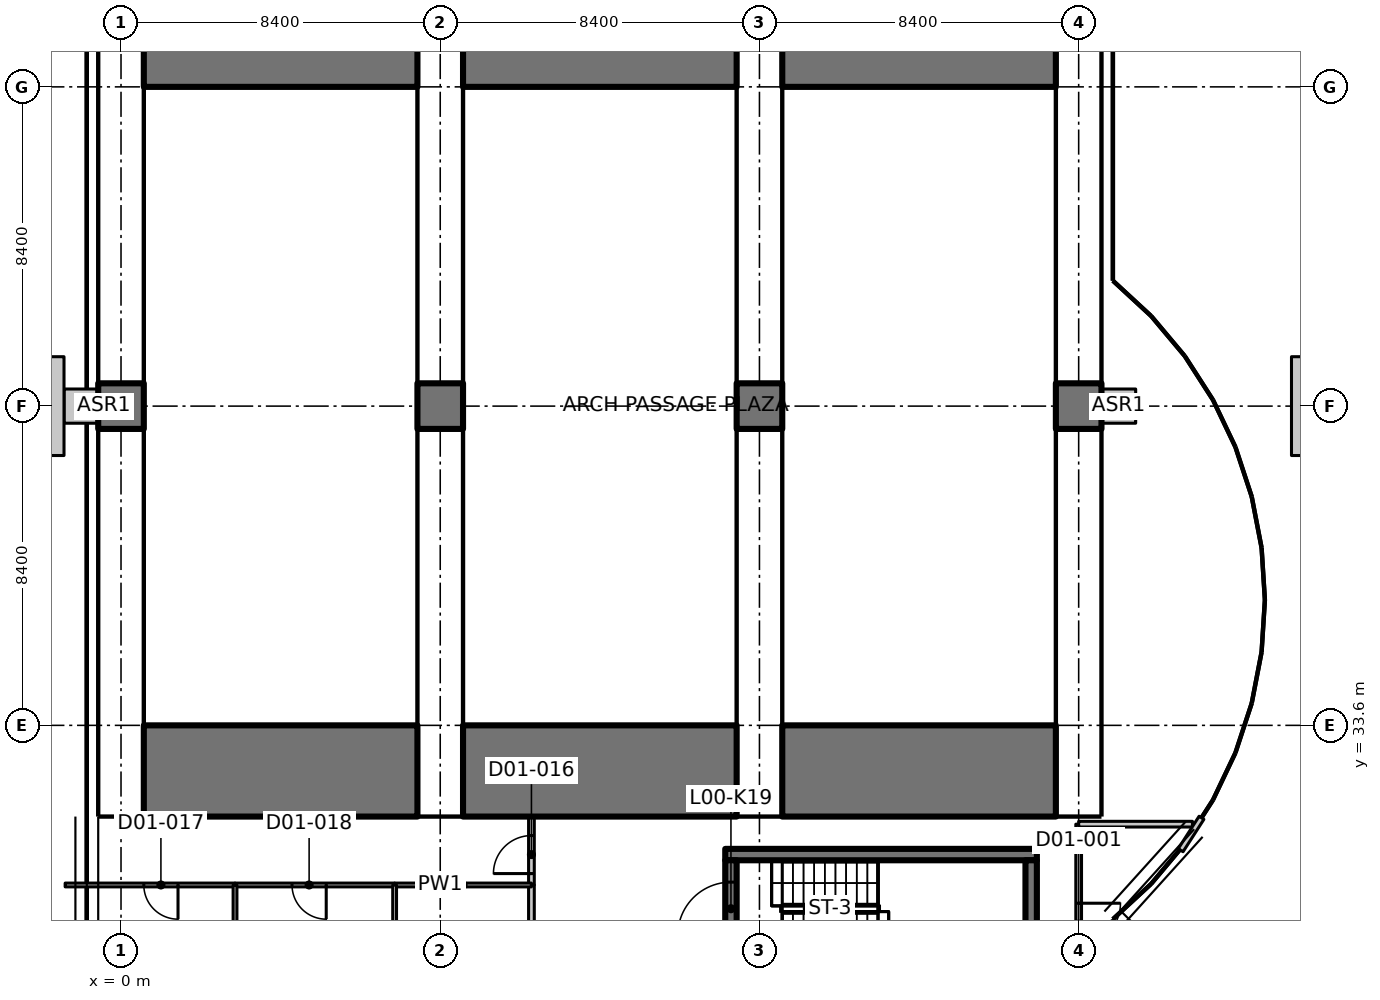
"""IFC4 building model, lengths in metres.
Left out: names, types, materials, properties, quantities, classifications, styles, units other than length and angle.
Written with IfcOpenShell. Run it as: python <this file> out.ifc"""

import sys

from ifc_helpers import new_model, si_unit, direction, frame, frame_2d, origin, place, context, subcontext, project, spatial, polyline, rectangle, outline, extrude, element, fill, save


model = new_model("IFC4")
c1 = context("Model", 3, precision=1e-05, world=origin(), true_north=direction((0.0, 1.0)))
c2 = subcontext(c1, "Body", "Model", "MODEL_VIEW")
j1 = project(units=[si_unit("LENGTHUNIT", "METRE"), si_unit("PLANEANGLEUNIT", "RADIAN")], contexts=[c1])
p1 = place(None, origin())
s1 = spatial("IfcSite", under=j1, at=p1, CompositionType="ELEMENT")
p2 = place(p1, origin())
s2 = spatial("IfcBuilding", under=s1, at=p2, CompositionType="ELEMENT")
p3 = place(p2, origin())
s3 = spatial("IfcBuildingStorey", under=s2, at=p3, CompositionType="ELEMENT", Elevation=0.0)
p4 = place(p3, frame((-0.6, 42.0, 0.0), z_axis=(1.0, 0.0, 0.0), x_axis=(0.0, 1.0, 0.0)))
e1 = element("IfcWall", 1, at=p4, inside=s3, PredefinedType="SOLIDWALL", context=c2, shape_type="SweptSolid", body=[
    extrude(outline(polyline([(-10.8, -6.3), (10.8, -6.3), (10.8, 36.25), (-10.8, 36.25), (-10.8, -6.3)]), holes=[polyline([(-8.4, 0.0), (-8.4, 26.6), (-8.36, 27.423), (-8.239, 28.239), (-8.038, 29.038), (-7.76, 29.814), (-7.408, 30.56), (-6.984, 31.267), (-6.493, 31.929), (-5.94, 32.54), (-5.329, 33.093), (-4.667, 33.584), (-3.96, 34.008), (-3.215, 34.361), (-2.438, 34.638), (-1.639, 34.839), (-0.823, 34.959), (0.0, 35.0), (0.823, 34.959), (1.639, 34.839), (2.438, 34.638), (3.215, 34.361), (3.96, 34.008), (4.667, 33.584), (5.329, 33.093), (5.94, 32.54), (6.493, 31.929), (6.984, 31.267), (7.408, 30.56), (7.76, 29.814), (8.038, 29.038), (8.239, 28.239), (8.36, 27.423), (8.4, 26.6), (8.4, 0.0), (-8.4, 0.0)])]), origin(), (0.0, 0.0, 1.0), 1.2),
])
for number, where, z_axis, x_axis in (
    (2, (7.8, 42.0, 0.0), (1.0, 0.0, 0.0), (0.0, 1.0, 0.0)),
    (3, (16.2, 42.0, 0.0), (1.0, 0.0, 0.0), (0.0, 1.0, 0.0)),
    (4, (24.6, 42.0, 0.0), (1.0, 0.0, 0.0), (0.0, 1.0, 0.0)),
):
    element("IfcWall", number, at=place(p3, frame(where, z_axis=z_axis, x_axis=x_axis)), inside=s3, PredefinedType="SOLIDWALL", context=c2, shape_type="SweptSolid", body=[
        extrude(outline(polyline([(-10.8, -6.3), (10.8, -6.3), (10.8, 36.25), (-10.8, 36.25), (-10.8, -6.3)]), holes=[polyline([(-8.4, 0.0), (-8.4, 26.6), (-8.36, 27.423), (-8.239, 28.239), (-8.038, 29.038), (-7.76, 29.814), (-7.408, 30.56), (-6.984, 31.267), (-6.493, 31.929), (-5.94, 32.54), (-5.329, 33.093), (-4.667, 33.584), (-3.96, 34.008), (-3.215, 34.361), (-2.438, 34.638), (-1.639, 34.839), (-0.823, 34.959), (0.0, 35.0), (0.823, 34.959), (1.639, 34.839), (2.438, 34.638), (3.215, 34.361), (3.96, 34.008), (4.667, 33.584), (5.329, 33.093), (5.94, 32.54), (6.493, 31.929), (6.984, 31.267), (7.408, 30.56), (7.76, 29.814), (8.038, 29.038), (8.239, 28.239), (8.36, 27.423), (8.4, 26.6), (8.4, 0.0), (-8.4, 0.0)])]), origin(), (0.0, 0.0, 1.0), 1.2),
    ])
for number, where, z_axis, x_axis in (
    (5, (0.6, 32.4, -6.3), (0.0, 0.0, 1.0), (1.0, 0.0, 0.0)),
    (6, (9.0, 32.4, -6.3), (0.0, 0.0, 1.0), (1.0, 0.0, 0.0)),
):
    element("IfcWall", number, at=place(p3, frame(where, z_axis=z_axis, x_axis=x_axis)), inside=s3, PredefinedType="SOLIDWALL", context=c2, shape_type="SweptSolid", body=[
        extrude(rectangle(XDim=7.2, YDim=2.4, at=frame_2d((3.6, 0.0))), origin(), (0.0, 0.0, 1.0), 42.55),
    ])
p5 = place(p3, frame((17.4, 32.4, -6.3), z_axis=(0.0, 0.0, 1.0), x_axis=(1.0, 0.0, 0.0)))
e7 = element("IfcWall", 7, at=p5, inside=s3, PredefinedType="SOLIDWALL", context=c2, shape_type="SweptSolid", body=[
    extrude(rectangle(XDim=7.2, YDim=2.4, at=frame_2d((3.6, 0.0))), origin(), (0.0, 0.0, 1.0), 42.55),
])
for number, where, z_axis, x_axis in (
    (8, (0.6, 51.6, -6.3), (0.0, 0.0, 1.0), (1.0, 0.0, 0.0)),
    (9, (9.0, 51.6, -6.3), (0.0, 0.0, 1.0), (1.0, 0.0, 0.0)),
):
    element("IfcWall", number, at=place(p3, frame(where, z_axis=z_axis, x_axis=x_axis)), inside=s3, PredefinedType="SOLIDWALL", context=c2, shape_type="SweptSolid", body=[
        extrude(rectangle(XDim=7.2, YDim=2.4, at=frame_2d((3.6, 0.0))), origin(), (0.0, 0.0, 1.0), 42.55),
    ])
p6 = place(p3, frame((17.4, 51.6, -6.3), z_axis=(0.0, 0.0, 1.0), x_axis=(1.0, 0.0, 0.0)))
e10 = element("IfcWall", 10, at=p6, inside=s3, PredefinedType="SOLIDWALL", context=c2, shape_type="SweptSolid", body=[
    extrude(rectangle(XDim=7.2, YDim=2.4, at=frame_2d((3.6, 0.0))), origin(), (0.0, 0.0, 1.0), 42.55),
])
p7 = place(p3, frame((-1.5, 42.0, 0.0), z_axis=(1.0, 0.0, 0.0), x_axis=(0.0, 1.0, 0.0)))
e11 = element("IfcWall", 11, at=p7, inside=s3, PredefinedType="SOLIDWALL", context=c2, shape_type="SweptSolid", body=[
    extrude(outline(polyline([(5.4, 35.953), (6.0, 35.58), (6.575, 35.168), (7.121, 34.72), (7.637, 34.237), (8.12, 33.721), (8.568, 33.175), (8.98, 32.6), (9.353, 32.0), (9.686, 31.377), (9.978, 30.733), (10.227, 30.072), (10.432, 29.395), (10.593, 28.707), (10.708, 28.01), (10.777, 27.306), (10.8, 26.6), (10.8, 0.0), (8.4, 0.0), (8.4, 26.6), (8.382, 27.149), (8.328, 27.696), (8.239, 28.239), (8.114, 28.774), (7.954, 29.3), (7.76, 29.814), (7.534, 30.315), (7.275, 30.8), (6.984, 31.267), (6.664, 31.714), (6.315, 32.138), (5.94, 32.54), (5.539, 32.915), (5.114, 33.264), (4.667, 33.584), (4.2, 33.875), (3.715, 34.134), (3.215, 34.361), (2.7, 34.554), (2.174, 34.714), (1.639, 34.839), (1.096, 34.928), (0.549, 34.982), (0.0, 35.0), (-0.549, 34.982), (-1.096, 34.928), (-1.639, 34.839), (-2.174, 34.714), (-2.7, 34.554), (-3.215, 34.361), (-3.715, 34.134), (-4.2, 33.875), (-4.667, 33.584), (-5.114, 33.264), (-5.539, 32.915), (-5.94, 32.54), (-6.315, 32.138), (-6.664, 31.714), (-6.984, 31.267), (-7.275, 30.8), (-7.534, 30.315), (-7.76, 29.814), (-7.954, 29.3), (-8.114, 28.774), (-8.239, 28.239), (-8.328, 27.696), (-8.382, 27.149), (-8.4, 26.6), (-8.4, 0.0), (-10.8, 0.0), (-10.8, 26.6), (-10.777, 27.306), (-10.708, 28.01), (-10.593, 28.707), (-10.432, 29.395), (-10.227, 30.072), (-9.978, 30.733), (-9.686, 31.377), (-9.353, 32.0), (-8.98, 32.6), (-8.568, 33.175), (-8.12, 33.721), (-7.637, 34.237), (-7.121, 34.72), (-6.575, 35.168), (-6.0, 35.58), (-5.4, 35.953), (-4.844, 36.25), (4.844, 36.25), (5.4, 35.953)])), origin(), (0.0, 0.0, 1.0), 0.9),
])
p8 = place(p3, frame((-4.1, 42.0, 0.0), z_axis=(1.0, 0.0, 0.0), x_axis=(0.0, 1.0, 0.0)))
e12 = element("IfcWall", 12, at=p8, inside=s3, PredefinedType="SOLIDWALL", context=c2, shape_type="SweptSolid", body=[
    extrude(outline(polyline([(13.304, 32.111), (13.636, 31.229), (13.909, 30.327), (14.123, 29.409), (14.277, 28.479), (14.369, 27.542), (14.4, 26.6), (14.4, 0.0), (8.4, 0.0), (8.4, 26.6), (8.382, 27.149), (8.328, 27.696), (8.239, 28.239), (8.114, 28.774), (7.954, 29.3), (7.76, 29.814), (7.534, 30.315), (7.275, 30.8), (6.984, 31.267), (6.664, 31.714), (6.315, 32.138), (5.94, 32.54), (5.539, 32.915), (5.114, 33.264), (4.667, 33.584), (4.2, 33.875), (3.715, 34.134), (3.215, 34.361), (2.7, 34.554), (2.174, 34.714), (1.639, 34.839), (1.096, 34.928), (0.549, 34.982), (0.0, 35.0), (-0.549, 34.982), (-1.096, 34.928), (-1.639, 34.839), (-2.174, 34.714), (-2.7, 34.554), (-3.215, 34.361), (-3.715, 34.134), (-4.2, 33.875), (-4.667, 33.584), (-5.114, 33.264), (-5.539, 32.915), (-5.94, 32.54), (-6.315, 32.138), (-6.664, 31.714), (-6.984, 31.267), (-7.275, 30.8), (-7.534, 30.315), (-7.76, 29.814), (-7.954, 29.3), (-8.114, 28.774), (-8.239, 28.239), (-8.328, 27.696), (-8.382, 27.149), (-8.4, 26.6), (-8.4, 0.0), (-14.4, 0.0), (-14.4, 26.6), (-14.369, 27.542), (-14.277, 28.479), (-14.123, 29.409), (-13.909, 30.327), (-13.636, 31.229), (-13.304, 32.111), (-13.241, 32.25), (-10.8, 32.25), (-10.8, 36.123), (-10.182, 36.782), (-9.495, 37.427), (-8.766, 38.024), (-8.0, 38.573), (-7.2, 39.071), (-6.369, 39.515), (-5.51, 39.904), (-4.629, 40.236), (-3.727, 40.509), (-2.809, 40.723), (-1.88, 40.877), (-0.942, 40.969), (0.0, 41.0), (0.942, 40.969), (1.88, 40.877), (2.809, 40.723), (3.727, 40.509), (4.629, 40.236), (5.51, 39.904), (6.369, 39.515), (7.2, 39.071), (8.0, 38.573), (8.766, 38.024), (9.495, 37.427), (10.182, 36.782), (10.8, 36.123), (10.8, 32.25), (13.241, 32.25), (13.304, 32.111)])), origin(), (0.0, 0.0, 1.0), 2.6),
])
p9 = place(p3, frame((25.8, 42.0, 0.0), z_axis=(1.0, 0.0, 0.0), x_axis=(0.0, 1.0, 0.0)))
e13 = element("IfcWall", 13, at=p9, inside=s3, PredefinedType="SOLIDWALL", context=c2, shape_type="SweptSolid", body=[
    extrude(outline(polyline([(5.4, 35.953), (6.0, 35.58), (6.575, 35.168), (7.121, 34.72), (7.637, 34.237), (8.12, 33.721), (8.568, 33.175), (8.98, 32.6), (9.353, 32.0), (9.686, 31.377), (9.978, 30.733), (10.227, 30.072), (10.432, 29.395), (10.593, 28.707), (10.708, 28.01), (10.777, 27.306), (10.8, 26.6), (10.8, 0.0), (8.4, 0.0), (8.4, 26.6), (8.382, 27.149), (8.328, 27.696), (8.239, 28.239), (8.114, 28.774), (7.954, 29.3), (7.76, 29.814), (7.534, 30.315), (7.275, 30.8), (6.984, 31.267), (6.664, 31.714), (6.315, 32.138), (5.94, 32.54), (5.539, 32.915), (5.114, 33.264), (4.667, 33.584), (4.2, 33.875), (3.715, 34.134), (3.215, 34.361), (2.7, 34.554), (2.174, 34.714), (1.639, 34.839), (1.096, 34.928), (0.549, 34.982), (0.0, 35.0), (-0.549, 34.982), (-1.096, 34.928), (-1.639, 34.839), (-2.174, 34.714), (-2.7, 34.554), (-3.215, 34.361), (-3.715, 34.134), (-4.2, 33.875), (-4.667, 33.584), (-5.114, 33.264), (-5.539, 32.915), (-5.94, 32.54), (-6.315, 32.138), (-6.664, 31.714), (-6.984, 31.267), (-7.275, 30.8), (-7.534, 30.315), (-7.76, 29.814), (-7.954, 29.3), (-8.114, 28.774), (-8.239, 28.239), (-8.328, 27.696), (-8.382, 27.149), (-8.4, 26.6), (-8.4, 0.0), (-10.8, 0.0), (-10.8, 26.6), (-10.777, 27.306), (-10.708, 28.01), (-10.593, 28.707), (-10.432, 29.395), (-10.227, 30.072), (-9.978, 30.733), (-9.686, 31.377), (-9.353, 32.0), (-8.98, 32.6), (-8.568, 33.175), (-8.12, 33.721), (-7.637, 34.237), (-7.121, 34.72), (-6.575, 35.168), (-6.0, 35.58), (-5.4, 35.953), (-4.844, 36.25), (4.844, 36.25), (5.4, 35.953)])), origin(), (0.0, 0.0, 1.0), 0.9),
])
p10 = place(p3, frame((30.8, 42.0, 0.0), z_axis=(1.0, 0.0, 0.0), x_axis=(0.0, 1.0, 0.0)))
e14 = element("IfcWall", 14, at=p10, inside=s3, PredefinedType="SOLIDWALL", context=c2, shape_type="SweptSolid", body=[
    extrude(outline(polyline([(13.304, 32.111), (13.636, 31.229), (13.909, 30.327), (14.123, 29.409), (14.277, 28.479), (14.369, 27.542), (14.4, 26.6), (14.4, 0.0), (8.4, 0.0), (8.4, 26.6), (8.382, 27.149), (8.328, 27.696), (8.239, 28.239), (8.114, 28.774), (7.954, 29.3), (7.76, 29.814), (7.534, 30.315), (7.275, 30.8), (6.984, 31.267), (6.664, 31.714), (6.315, 32.138), (5.94, 32.54), (5.539, 32.915), (5.114, 33.264), (4.667, 33.584), (4.2, 33.875), (3.715, 34.134), (3.215, 34.361), (2.7, 34.554), (2.174, 34.714), (1.639, 34.839), (1.096, 34.928), (0.549, 34.982), (0.0, 35.0), (-0.549, 34.982), (-1.096, 34.928), (-1.639, 34.839), (-2.174, 34.714), (-2.7, 34.554), (-3.215, 34.361), (-3.715, 34.134), (-4.2, 33.875), (-4.667, 33.584), (-5.114, 33.264), (-5.539, 32.915), (-5.94, 32.54), (-6.315, 32.138), (-6.664, 31.714), (-6.984, 31.267), (-7.275, 30.8), (-7.534, 30.315), (-7.76, 29.814), (-7.954, 29.3), (-8.114, 28.774), (-8.239, 28.239), (-8.328, 27.696), (-8.382, 27.149), (-8.4, 26.6), (-8.4, 0.0), (-14.4, 0.0), (-14.4, 26.6), (-14.369, 27.542), (-14.277, 28.479), (-14.123, 29.409), (-13.909, 30.327), (-13.636, 31.229), (-13.304, 32.111), (-13.241, 32.25), (-10.8, 32.25), (-10.8, 36.123), (-10.182, 36.782), (-9.495, 37.427), (-8.766, 38.024), (-8.0, 38.573), (-7.2, 39.071), (-6.369, 39.515), (-5.51, 39.904), (-4.629, 40.236), (-3.727, 40.509), (-2.809, 40.723), (-1.88, 40.877), (-0.942, 40.969), (0.0, 41.0), (0.942, 40.969), (1.88, 40.877), (2.809, 40.723), (3.727, 40.509), (4.629, 40.236), (5.51, 39.904), (6.369, 39.515), (7.2, 39.071), (8.0, 38.573), (8.766, 38.024), (9.495, 37.427), (10.182, 36.782), (10.8, 36.123), (10.8, 32.25), (13.241, 32.25), (13.304, 32.111)])), origin(), (0.0, 0.0, 1.0), 2.6),
])
p11 = place(p3, frame((15.9, 30.2, 0.0), z_axis=(0.0, 0.0, 1.0), x_axis=(1.0, 0.0, 0.0)))
e15 = element("IfcWall", 15, at=p11, inside=s3, PredefinedType="SHEAR", context=c2, shape_type="SweptSolid", body=[
    extrude(rectangle(XDim=8.2, YDim=0.3, at=frame_2d((4.1, 0.0))), origin(), (0.0, 0.0, 1.0), 6.75),
])
p12 = place(p3, frame((16.05, 27.5, 0.0), z_axis=(0.0, 0.0, 1.0), x_axis=(0.0, 1.0, 0.0)))
e16 = element("IfcWall", 16, at=p12, inside=s3, PredefinedType="SHEAR", context=c2, shape_type="SweptSolid", body=[
    extrude(rectangle(XDim=2.55, YDim=0.3, at=frame_2d((1.275, 0.0))), origin(), (0.0, 0.0, 1.0), 6.75),
])
p13 = place(p12, frame((0.575, 0.0, 0.0)))
e17 = element("IfcOpeningElement", 17, at=p13, cuts=e16, PredefinedType="OPENING", context=c2, shape_type="SweptSolid", body=[
    extrude(rectangle(XDim=1.4, YDim=2.1, at=frame_2d((0.7, 1.05))), frame((0.0, 0.16, 0.0), z_axis=(0.0, -1.0, 0.0), x_axis=(1.0, 0.0, 0.0)), (0.0, 0.0, 1.0), 0.32),
])
p14 = place(p3, frame((23.95, 27.5, 0.0), z_axis=(0.0, 0.0, 1.0), x_axis=(0.0, 1.0, 0.0)))
e18 = element("IfcWall", 18, at=p14, inside=s3, PredefinedType="SHEAR", context=c2, shape_type="SweptSolid", body=[
    extrude(rectangle(XDim=2.55, YDim=0.3, at=frame_2d((1.275, 0.0))), origin(), (0.0, 0.0, 1.0), 6.75),
])
p15 = place(p3, frame((25.2, 31.0, 0.0), z_axis=(0.0, 0.0, 1.0), x_axis=(0.0, -1.0, 0.0)))
e19 = element("IfcWall", 19, at=p15, inside=s3, PredefinedType="PARTITIONING", context=c2, shape_type="SweptSolid", body=[
    extrude(rectangle(XDim=4.98, YDim=0.15, at=frame_2d((2.49, 0.0))), origin(), (0.0, 0.0, 1.0), 6.73),
])
p16 = place(p15, frame((2.08, 0.0, 0.0)))
e20 = element("IfcOpeningElement", 20, at=p16, cuts=e19, PredefinedType="OPENING", context=c2, shape_type="SweptSolid", body=[
    extrude(rectangle(XDim=1.1, YDim=2.1, at=frame_2d((0.55, 1.05))), frame((0.0, 0.085, 0.0), z_axis=(0.0, -1.0, 0.0), x_axis=(1.0, 0.0, 0.0)), (0.0, 0.0, 1.0), 0.17),
])
p17 = place(p3, frame((25.2, 31.0, 0.0), z_axis=(0.0, 0.0, 1.0), x_axis=(1.0, 0.0, 0.0)))
e21 = element("IfcWall", 21, at=p17, inside=s3, PredefinedType="PARTITIONING", context=c2, shape_type="SweptSolid", body=[
    extrude(rectangle(XDim=2.994, YDim=0.15, at=frame_2d((1.497, 0.0))), origin(), (0.0, 0.0, 1.0), 6.73),
])
p18 = place(p3, frame((28.432, 31.168, 0.0), z_axis=(0.0, 0.0, 1.0), x_axis=(-0.540854867502, -0.841115932734, 0.0)))
e22 = element("IfcWall", 22, at=p18, inside=s3, PredefinedType="PARTITIONING", context=c2, shape_type="SweptSolid", body=[
    extrude(rectangle(XDim=1.015, YDim=0.15, at=frame_2d((0.507, 0.0))), origin(), (0.0, 0.0, 1.0), 6.73),
])
p19 = place(p3, frame((10.8, 29.4, 0.0), z_axis=(0.0, 0.0, 1.0), x_axis=(0.0, 1.0, 0.0)))
e23 = element("IfcWall", 23, at=p19, inside=s3, PredefinedType="PARTITIONING", context=c2, shape_type="SweptSolid", body=[
    extrude(rectangle(XDim=1.8, YDim=0.15, at=frame_2d((0.9, 0.0))), origin(), (0.0, 0.0, 1.0), 6.73),
])
p20 = place(p19, frame((0.3, 0.0, 0.0)))
e24 = element("IfcOpeningElement", 24, at=p20, cuts=e23, PredefinedType="OPENING", context=c2, shape_type="SweptSolid", body=[
    extrude(rectangle(XDim=1.0, YDim=2.1, at=frame_2d((0.5, 1.05))), frame((0.0, 0.085, 0.0), z_axis=(0.0, -1.0, 0.0), x_axis=(1.0, 0.0, 0.0)), (0.0, 0.0, 1.0), 0.17),
])
p21 = place(p3, frame((10.8, 25.2, 0.0), z_axis=(0.0, 0.0, 1.0), x_axis=(0.0, 1.0, 0.0)))
e25 = element("IfcWall", 25, at=p21, inside=s3, PredefinedType="PARTITIONING", context=c2, shape_type="SweptSolid", body=[
    extrude(rectangle(XDim=4.2, YDim=0.15, at=frame_2d((2.1, 0.0))), origin(), (0.0, 0.0, 1.0), 6.73),
])
p22 = place(p3, frame((3.0, 29.4, 0.0), z_axis=(0.0, 0.0, 1.0), x_axis=(-1.0, 0.0, 0.0)))
e26 = element("IfcWall", 26, at=p22, inside=s3, PredefinedType="PARTITIONING", context=c2, shape_type="SweptSolid", body=[
    extrude(rectangle(XDim=4.47, YDim=0.1, at=frame_2d((2.235, 0.0))), origin(), (0.0, 0.0, 1.0), 6.73),
])
p23 = place(p22, frame((1.5, 0.0, 0.0)))
e27 = element("IfcOpeningElement", 27, at=p23, cuts=e26, PredefinedType="OPENING", context=c2, shape_type="SweptSolid", body=[
    extrude(rectangle(XDim=0.9, YDim=2.1, at=frame_2d((0.45, 1.05))), frame((0.0, 0.06, 0.0), z_axis=(0.0, -1.0, 0.0), x_axis=(1.0, 0.0, 0.0)), (0.0, 0.0, 1.0), 0.12),
])
p24 = place(p3, frame((7.2, 29.4, 0.0), z_axis=(0.0, 0.0, 1.0), x_axis=(-1.0, 0.0, 0.0)))
e28 = element("IfcWall", 28, at=p24, inside=s3, PredefinedType="PARTITIONING", context=c2, shape_type="SweptSolid", body=[
    extrude(rectangle(XDim=4.2, YDim=0.1, at=frame_2d((2.1, 0.0))), origin(), (0.0, 0.0, 1.0), 6.73),
])
p25 = place(p24, frame((1.8, 0.0, 0.0)))
e29 = element("IfcOpeningElement", 29, at=p25, cuts=e28, PredefinedType="OPENING", context=c2, shape_type="SweptSolid", body=[
    extrude(rectangle(XDim=0.9, YDim=2.1, at=frame_2d((0.45, 1.05))), frame((0.0, 0.06, 0.0), z_axis=(0.0, -1.0, 0.0), x_axis=(1.0, 0.0, 0.0)), (0.0, 0.0, 1.0), 0.12),
])
p26 = place(p3, frame((10.8, 29.4, 0.0), z_axis=(0.0, 0.0, 1.0), x_axis=(-1.0, 0.0, 0.0)))
e30 = element("IfcWall", 30, at=p26, inside=s3, PredefinedType="PARTITIONING", context=c2, shape_type="SweptSolid", body=[
    extrude(rectangle(XDim=3.6, YDim=0.1, at=frame_2d((1.8, 0.0))), origin(), (0.0, 0.0, 1.0), 6.73),
])
p27 = place(p3, frame((3.0, 29.4, 0.0), z_axis=(0.0, 0.0, 1.0), x_axis=(0.0, -1.0, 0.0)))
e31 = element("IfcWall", 31, at=p27, inside=s3, PredefinedType="PARTITIONING", context=c2, shape_type="SweptSolid", body=[
    extrude(rectangle(XDim=4.2, YDim=0.1, at=frame_2d((2.1, 0.0))), origin(), (0.0, 0.0, 1.0), 6.73),
])
p28 = place(p3, frame((7.2, 29.4, 0.0), z_axis=(0.0, 0.0, 1.0), x_axis=(0.0, -1.0, 0.0)))
e32 = element("IfcWall", 32, at=p28, inside=s3, PredefinedType="PARTITIONING", context=c2, shape_type="SweptSolid", body=[
    extrude(rectangle(XDim=4.2, YDim=0.1, at=frame_2d((2.1, 0.0))), origin(), (0.0, 0.0, 1.0), 6.73),
])
p29 = place(p28, frame((1.5, 0.0, 0.0)))
e33 = element("IfcOpeningElement", 33, at=p29, cuts=e32, PredefinedType="OPENING", context=c2, shape_type="SweptSolid", body=[
    extrude(rectangle(XDim=0.9, YDim=2.1, at=frame_2d((0.45, 1.05))), frame((0.0, 0.06, 0.0), z_axis=(0.0, -1.0, 0.0), x_axis=(1.0, 0.0, 0.0)), (0.0, 0.0, 1.0), 0.12),
])
p30 = place(p13, origin())
e34 = element("IfcDoor", 34, at=p30, inside=s3, OperationType="SINGLE_SWING_RIGHT", PredefinedType="DOOR", context=c2, shape_type="SweptSolid", body=[
    extrude(rectangle(XDim=1.4, YDim=2.1, at=frame_2d((0.7, 1.05))), frame((0.0, 0.025, 0.0), z_axis=(0.0, -1.0, 0.0), x_axis=(1.0, 0.0, 0.0)), (0.0, 0.0, 1.0), 0.05),
])
fill(e17, e34)
p31 = place(p16, origin())
e35 = element("IfcDoor", 35, at=p31, inside=s3, OperationType="SINGLE_SWING_RIGHT", PredefinedType="DOOR", context=c2, shape_type="SweptSolid", body=[
    extrude(rectangle(XDim=1.1, YDim=2.1, at=frame_2d((0.55, 1.05))), frame((0.0, 0.025, 0.0), z_axis=(0.0, -1.0, 0.0), x_axis=(1.0, 0.0, 0.0)), (0.0, 0.0, 1.0), 0.05),
])
fill(e20, e35)
p32 = place(p20, origin())
e36 = element("IfcDoor", 36, at=p32, inside=s3, OperationType="SINGLE_SWING_LEFT", PredefinedType="DOOR", context=c2, shape_type="SweptSolid", body=[
    extrude(rectangle(XDim=1.0, YDim=2.1, at=frame_2d((0.5, 1.05))), frame((0.0, 0.025, 0.0), z_axis=(0.0, -1.0, 0.0), x_axis=(1.0, 0.0, 0.0)), (0.0, 0.0, 1.0), 0.05),
])
fill(e24, e36)
p33 = place(p23, origin())
e37 = element("IfcDoor", 37, at=p33, inside=s3, OperationType="SINGLE_SWING_LEFT", PredefinedType="DOOR", context=c2, shape_type="SweptSolid", body=[
    extrude(rectangle(XDim=0.9, YDim=2.1, at=frame_2d((0.45, 1.05))), frame((0.0, 0.025, 0.0), z_axis=(0.0, -1.0, 0.0), x_axis=(1.0, 0.0, 0.0)), (0.0, 0.0, 1.0), 0.05),
])
fill(e27, e37)
p34 = place(p25, origin())
e38 = element("IfcDoor", 38, at=p34, inside=s3, OperationType="SINGLE_SWING_LEFT", PredefinedType="DOOR", context=c2, shape_type="SweptSolid", body=[
    extrude(rectangle(XDim=0.9, YDim=2.1, at=frame_2d((0.45, 1.05))), frame((0.0, 0.025, 0.0), z_axis=(0.0, -1.0, 0.0), x_axis=(1.0, 0.0, 0.0)), (0.0, 0.0, 1.0), 0.05),
])
fill(e29, e38)
save(model, sys.argv[1])
